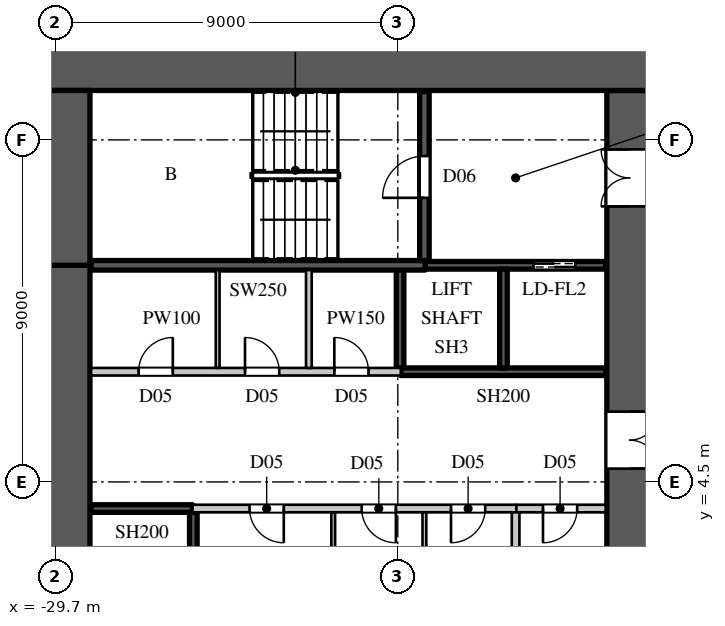
"""IFC4 building model, lengths in metres.
Left out: names, types, materials, properties, quantities, classifications, styles, units other than length and angle.
Written with IfcOpenShell. Run it as: python <this file> out.ifc"""

import sys

from ifc_helpers import new_model, si_unit, direction, frame, frame_2d, origin, place, context, subcontext, project, spatial, rectangle, extrude, element, fill, save


model = new_model("IFC4")
c1 = context("Model", 3, precision=1e-05, world=origin(), true_north=direction((0.0, 1.0)))
c2 = subcontext(c1, "Body", "Model", "MODEL_VIEW")
j1 = project(units=[si_unit("LENGTHUNIT", "METRE"), si_unit("PLANEANGLEUNIT", "RADIAN")], contexts=[c1])
p1 = place(None, origin())
s1 = spatial("IfcSite", under=j1, at=p1, CompositionType="ELEMENT")
p2 = place(p1, origin())
s2 = spatial("IfcBuilding", under=s1, at=p2, CompositionType="ELEMENT")
p3 = place(p2, frame((0.0, 0.0, 44.0)))
s3 = spatial("IfcBuildingStorey", under=s2, at=p3, CompositionType="ELEMENT", Elevation=44.0)
p4 = place(p3, frame((-30.0, 15.4, 0.0), z_axis=(0.0, 0.0, 1.0), x_axis=(1.0, 0.0, 0.0)))
e1 = element("IfcWall", 1, at=p4, inside=s3, PredefinedType="SHEAR", context=c2, shape_type="SweptSolid", body=[
    extrude(rectangle(XDim=16.0, YDim=1.2, at=frame_2d((8.0, 0.0))), origin(), (0.0, 0.0, 1.0), 6.0),
])
p5 = place(p3, frame((-14.6, -14.8, 0.0), z_axis=(0.0, 0.0, 1.0), x_axis=(0.0, 1.0, 0.0)))
e2 = element("IfcWall", 2, at=p5, inside=s3, PredefinedType="SHEAR", context=c2, shape_type="SweptSolid", body=[
    extrude(rectangle(XDim=29.6, YDim=1.2, at=frame_2d((14.8, 0.0))), origin(), (0.0, 0.0, 1.0), 6.0),
])
p6 = place(p5, frame((1.55, 0.0, 0.0)))
e3 = element("IfcOpeningElement", 3, at=p6, cuts=e2, PredefinedType="OPENING", context=c2, shape_type="SweptSolid", body=[
    extrude(rectangle(XDim=1.5, YDim=2.4, at=frame_2d((0.75, 1.2))), frame((0.0, 0.61, 0.0), z_axis=(0.0, -1.0, 0.0), x_axis=(1.0, 0.0, 0.0)), (0.0, 0.0, 1.0), 1.22),
])
p7 = place(p5, frame((26.55, 0.0, 0.0)))
e4 = element("IfcOpeningElement", 4, at=p7, cuts=e2, PredefinedType="OPENING", context=c2, shape_type="SweptSolid", body=[
    extrude(rectangle(XDim=1.5, YDim=2.4, at=frame_2d((0.75, 1.2))), frame((0.0, 0.61, 0.0), z_axis=(0.0, -1.0, 0.0), x_axis=(1.0, 0.0, 0.0)), (0.0, 0.0, 1.0), 1.22),
])
p8 = place(p5, frame((8.45, 0.0, 0.0)))
e5 = element("IfcOpeningElement", 5, at=p8, cuts=e2, PredefinedType="OPENING", context=c2, shape_type="SweptSolid", body=[
    extrude(rectangle(XDim=1.5, YDim=2.4, at=frame_2d((0.75, 1.2))), frame((0.0, 0.61, 0.0), z_axis=(0.0, -1.0, 0.0), x_axis=(1.0, 0.0, 0.0)), (0.0, 0.0, 1.0), 1.22),
])
p9 = place(p5, frame((19.65, 0.0, 0.0)))
e6 = element("IfcOpeningElement", 6, at=p9, cuts=e2, PredefinedType="OPENING", context=c2, shape_type="SweptSolid", body=[
    extrude(rectangle(XDim=1.5, YDim=2.4, at=frame_2d((0.75, 1.2))), frame((0.0, 0.61, 0.0), z_axis=(0.0, -1.0, 0.0), x_axis=(1.0, 0.0, 0.0)), (0.0, 0.0, 1.0), 1.22),
])
p10 = place(p5, frame((14.5, 0.0, 0.0)))
e7 = element("IfcOpeningElement", 7, at=p10, cuts=e2, PredefinedType="OPENING", context=c2, shape_type="SweptSolid", body=[
    extrude(rectangle(XDim=0.6, YDim=2.0, at=frame_2d((0.3, 1.0))), frame((0.0, 0.61, 0.0), z_axis=(0.0, -1.0, 0.0), x_axis=(1.0, 0.0, 0.0)), (0.0, 0.0, 1.0), 1.22),
])
p11 = place(p3, frame((-29.4, -10.2, 0.0), z_axis=(0.0, 0.0, 1.0), x_axis=(0.0, 1.0, 0.0)))
e8 = element("IfcWall", 8, at=p11, inside=s3, PredefinedType="SHEAR", context=c2, shape_type="SweptSolid", body=[
    extrude(rectangle(XDim=20.4, YDim=1.2, at=frame_2d((10.2, 0.0))), origin(), (0.0, 0.0, 1.0), 6.0),
])
p12 = place(p3, frame((-29.4, 10.2, 0.0), z_axis=(0.0, 0.0, 1.0), x_axis=(0.0, 1.0, 0.0)))
e9 = element("IfcWall", 9, at=p12, inside=s3, PredefinedType="SHEAR", context=c2, shape_type="SweptSolid", body=[
    extrude(rectangle(XDim=4.6, YDim=1.2, at=frame_2d((2.3, 0.0))), origin(), (0.0, 0.0, 1.0), 6.0),
])
p13 = place(p3, frame((-28.77, 7.4, 0.0), z_axis=(0.0, 0.0, 1.0), x_axis=(1.0, 0.0, 0.0)))
e10 = element("IfcWall", 10, at=p13, inside=s3, PredefinedType="PARTITIONING", context=c2, shape_type="SweptSolid", body=[
    extrude(rectangle(XDim=8.15, YDim=0.2, at=frame_2d((4.075, 0.0))), origin(), (0.0, 0.0, 1.0), 5.596),
])
p14 = place(p13, frame((1.25, 0.0, 0.0)))
e11 = element("IfcOpeningElement", 11, at=p14, cuts=e10, PredefinedType="OPENING", context=c2, shape_type="SweptSolid", body=[
    extrude(rectangle(XDim=0.9, YDim=2.2, at=frame_2d((0.45, 1.1))), frame((0.0, 0.11, 0.0), z_axis=(0.0, -1.0, 0.0), x_axis=(1.0, 0.0, 0.0)), (0.0, 0.0, 1.0), 0.22),
])
p15 = place(p13, frame((4.05, 0.0, 0.0)))
e12 = element("IfcOpeningElement", 12, at=p15, cuts=e10, PredefinedType="OPENING", context=c2, shape_type="SweptSolid", body=[
    extrude(rectangle(XDim=0.9, YDim=2.2, at=frame_2d((0.45, 1.1))), frame((0.0, 0.11, 0.0), z_axis=(0.0, -1.0, 0.0), x_axis=(1.0, 0.0, 0.0)), (0.0, 0.0, 1.0), 0.22),
])
p16 = place(p13, frame((6.4, 0.0, 0.0)))
e13 = element("IfcOpeningElement", 13, at=p16, cuts=e10, PredefinedType="OPENING", context=c2, shape_type="SweptSolid", body=[
    extrude(rectangle(XDim=0.9, YDim=2.2, at=frame_2d((0.45, 1.1))), frame((0.0, 0.11, 0.0), z_axis=(0.0, -1.0, 0.0), x_axis=(1.0, 0.0, 0.0)), (0.0, 0.0, 1.0), 0.22),
])
p17 = place(p3, frame((-26.1, 3.8, 0.0), z_axis=(0.0, 0.0, 1.0), x_axis=(1.0, 0.0, 0.0)))
e14 = element("IfcWall", 14, at=p17, inside=s3, PredefinedType="PARTITIONING", context=c2, shape_type="SweptSolid", body=[
    extrude(rectangle(XDim=8.52, YDim=0.2, at=frame_2d((4.26, 0.0))), origin(), (0.0, 0.0, 1.0), 5.596),
])
p18 = place(p17, frame((1.5, 0.0, 0.0)))
e15 = element("IfcOpeningElement", 15, at=p18, cuts=e14, PredefinedType="OPENING", context=c2, shape_type="SweptSolid", body=[
    extrude(rectangle(XDim=0.9, YDim=2.2, at=frame_2d((0.45, 1.1))), frame((0.0, 0.11, 0.0), z_axis=(0.0, -1.0, 0.0), x_axis=(1.0, 0.0, 0.0)), (0.0, 0.0, 1.0), 0.22),
])
p19 = place(p17, frame((4.45, 0.0, 0.0)))
e16 = element("IfcOpeningElement", 16, at=p19, cuts=e14, PredefinedType="OPENING", context=c2, shape_type="SweptSolid", body=[
    extrude(rectangle(XDim=0.9, YDim=2.2, at=frame_2d((0.45, 1.1))), frame((0.0, 0.11, 0.0), z_axis=(0.0, -1.0, 0.0), x_axis=(1.0, 0.0, 0.0)), (0.0, 0.0, 1.0), 0.22),
])
p20 = place(p17, frame((6.8, 0.0, 0.0)))
e17 = element("IfcOpeningElement", 17, at=p20, cuts=e14, PredefinedType="OPENING", context=c2, shape_type="SweptSolid", body=[
    extrude(rectangle(XDim=0.9, YDim=2.2, at=frame_2d((0.45, 1.1))), frame((0.0, 0.11, 0.0), z_axis=(0.0, -1.0, 0.0), x_axis=(1.0, 0.0, 0.0)), (0.0, 0.0, 1.0), 0.22),
])
p21 = place(p3, frame((-23.04, 7.5, 0.0), z_axis=(0.0, 0.0, 1.0), x_axis=(0.0, 1.0, 0.0)))
e18 = element("IfcWall", 18, at=p21, inside=s3, PredefinedType="PARTITIONING", context=c2, shape_type="SweptSolid", body=[
    extrude(rectangle(XDim=2.575, YDim=0.15, at=frame_2d((1.288, 0.0))), origin(), (0.0, 0.0, 1.0), 5.596),
])
p22 = place(p3, frame((-17.58, 3.8, 0.0), z_axis=(0.0, 0.0, 1.0), x_axis=(1.0, 0.0, 0.0)))
e19 = element("IfcWall", 19, at=p22, inside=s3, PredefinedType="PARTITIONING", context=c2, shape_type="SweptSolid", body=[
    extrude(rectangle(XDim=2.35, YDim=0.2, at=frame_2d((1.175, 0.0))), origin(), (0.0, 0.0, 1.0), 5.596),
])
p23 = place(p22, frame((0.7, 0.0, 0.0)))
e20 = element("IfcOpeningElement", 20, at=p23, cuts=e19, PredefinedType="OPENING", context=c2, shape_type="SweptSolid", body=[
    extrude(rectangle(XDim=0.9, YDim=2.2, at=frame_2d((0.45, 1.1))), frame((0.0, 0.11, 0.0), z_axis=(0.0, -1.0, 0.0), x_axis=(1.0, 0.0, 0.0)), (0.0, 0.0, 1.0), 0.22),
])
p24 = place(p3, frame((-17.6, 1.1, 0.0), z_axis=(0.0, 0.0, 1.0), x_axis=(0.0, 1.0, 0.0)))
e21 = element("IfcWall", 21, at=p24, inside=s3, PredefinedType="PARTITIONING", context=c2, shape_type="SweptSolid", body=[
    extrude(rectangle(XDim=2.6, YDim=0.2, at=frame_2d((1.3, 0.0))), origin(), (0.0, 0.0, 1.0), 5.596),
])
p25 = place(p3, frame((-28.77, 3.8, 0.0), z_axis=(0.0, 0.0, 1.0), x_axis=(1.0, 0.0, 0.0)))
e22 = element("IfcWall", 22, at=p25, inside=s3, PredefinedType="SHEAR", context=c2, shape_type="SweptSolid", body=[
    extrude(rectangle(XDim=2.67, YDim=0.2, at=frame_2d((1.335, 0.0))), origin(), (0.0, 0.0, 1.0), 5.596),
])
p26 = place(p3, frame((-26.08, 1.1, 0.0), z_axis=(0.0, 0.0, 1.0), x_axis=(0.0, 1.0, 0.0)))
e23 = element("IfcWall", 23, at=p26, inside=s3, PredefinedType="SHEAR", context=c2, shape_type="SweptSolid", body=[
    extrude(rectangle(XDim=2.6, YDim=0.2, at=frame_2d((1.3, 0.0))), origin(), (0.0, 0.0, 1.0), 5.596),
])
p27 = place(p3, frame((-20.64, 7.5, 0.0), z_axis=(0.0, 0.0, 1.0), x_axis=(0.0, 1.0, 0.0)))
e24 = element("IfcWall", 24, at=p27, inside=s3, PredefinedType="SHEAR", context=c2, shape_type="SweptSolid", body=[
    extrude(rectangle(XDim=2.575, YDim=0.2, at=frame_2d((1.288, 0.0))), origin(), (0.0, 0.0, 1.0), 5.596),
])
p28 = place(p3, frame((-20.62, 7.4, 0.0), z_axis=(0.0, 0.0, 1.0), x_axis=(1.0, 0.0, 0.0)))
e25 = element("IfcWall", 25, at=p28, inside=s3, PredefinedType="SHEAR", context=c2, shape_type="SweptSolid", body=[
    extrude(rectangle(XDim=5.39, YDim=0.2, at=frame_2d((2.695, 0.0))), origin(), (0.0, 0.0, 1.0), 5.596),
])
p29 = place(p3, frame((-19.98, 10.2, 0.0), z_axis=(0.0, 0.0, 1.0), x_axis=(1.0, 0.0, 0.0)))
e26 = element("IfcWall", 26, at=p29, inside=s3, PredefinedType="SHEAR", context=c2, shape_type="SweptSolid", body=[
    extrude(rectangle(XDim=4.75, YDim=0.2, at=frame_2d((2.375, 0.0))), origin(), (0.0, 0.0, 1.0), 5.596),
])
p30 = place(p29, frame((2.85, 0.0, 0.0)))
e27 = element("IfcOpeningElement", 27, at=p30, cuts=e26, PredefinedType="OPENING", context=c2, shape_type="SweptSolid", body=[
    extrude(rectangle(XDim=1.1, YDim=2.2, at=frame_2d((0.55, 1.1))), frame((0.0, 0.11, 0.0), z_axis=(0.0, -1.0, 0.0), x_axis=(1.0, 0.0, 0.0)), (0.0, 0.0, 1.0), 0.22),
])
p31 = place(p3, frame((-17.92, 7.5, 0.0), z_axis=(0.0, 0.0, 1.0), x_axis=(0.0, 1.0, 0.0)))
e28 = element("IfcWall", 28, at=p31, inside=s3, PredefinedType="SHEAR", context=c2, shape_type="SweptSolid", body=[
    extrude(rectangle(XDim=2.6, YDim=0.2, at=frame_2d((1.3, 0.0))), origin(), (0.0, 0.0, 1.0), 6.0),
])
p32 = place(p3, frame((-28.77, 10.2, 0.0), z_axis=(0.0, 0.0, 1.0), x_axis=(1.0, 0.0, 0.0)))
e29 = element("IfcWall", 29, at=p32, inside=s3, PredefinedType="SHEAR", context=c2, shape_type="SweptSolid", body=[
    extrude(rectangle(XDim=8.79, YDim=0.25, at=frame_2d((4.395, 0.0))), origin(), (0.0, 0.0, 1.0), 5.596),
])
p33 = place(p3, frame((-20.0, 10.325, 0.0), z_axis=(0.0, 0.0, 1.0), x_axis=(0.0, 1.0, 0.0)))
e30 = element("IfcWall", 30, at=p33, inside=s3, PredefinedType="SHEAR", context=c2, shape_type="SweptSolid", body=[
    extrude(rectangle(XDim=4.445, YDim=0.25, at=frame_2d((2.223, 0.0))), origin(), (0.0, 0.0, 1.0), 5.596),
])
p34 = place(p33, frame((1.65, 0.0, 0.0)))
e31 = element("IfcOpeningElement", 31, at=p34, cuts=e30, PredefinedType="OPENING", context=c2, shape_type="SweptSolid", body=[
    extrude(rectangle(XDim=1.1, YDim=2.2, at=frame_2d((0.55, 1.1))), frame((0.0, 0.135, 0.0), z_axis=(0.0, -1.0, 0.0), x_axis=(1.0, 0.0, 0.0)), (0.0, 0.0, 1.0), 0.27),
])
p35 = place(p3, frame((-25.44, 7.5, 0.0), z_axis=(0.0, 0.0, 1.0), x_axis=(0.0, 1.0, 0.0)))
e32 = element("IfcWall", 32, at=p35, inside=s3, PredefinedType="PARTITIONING", context=c2, shape_type="SweptSolid", body=[
    extrude(rectangle(XDim=2.575, YDim=0.1, at=frame_2d((1.288, 0.0))), origin(), (0.0, 0.0, 1.0), 5.596),
])
for number, where, z_axis, x_axis in (
    (33, (-22.4, 1.1, 0.0), (0.0, 0.0, 1.0), (0.0, 1.0, 0.0)),
    (34, (-20.0, 1.1, 0.0), (0.0, 0.0, 1.0), (0.0, 1.0, 0.0)),
):
    element("IfcWall", number, at=place(p3, frame(where, z_axis=z_axis, x_axis=x_axis)), inside=s3, PredefinedType="PARTITIONING", context=c2, shape_type="SweptSolid", body=[
        extrude(rectangle(XDim=2.6, YDim=0.1, at=frame_2d((1.3, 0.0))), origin(), (0.0, 0.0, 1.0), 5.596),
    ])
p36 = place(p34, origin())
e35 = element("IfcDoor", 35, at=p36, inside=s3, OperationType="SINGLE_SWING_LEFT", PredefinedType="DOOR", context=c2, shape_type="SweptSolid", body=[
    extrude(rectangle(XDim=1.1, YDim=2.2, at=frame_2d((0.55, 1.1))), frame((0.0, 0.025, 0.0), z_axis=(0.0, -1.0, 0.0), x_axis=(1.0, 0.0, 0.0)), (0.0, 0.0, 1.0), 0.05),
])
fill(e31, e35)
p37 = place(p18, origin())
e36 = element("IfcDoor", 36, at=p37, inside=s3, OperationType="SINGLE_SWING_LEFT", PredefinedType="DOOR", context=c2, shape_type="SweptSolid", body=[
    extrude(rectangle(XDim=0.9, YDim=2.2, at=frame_2d((0.45, 1.1))), frame((0.0, 0.025, 0.0), z_axis=(0.0, -1.0, 0.0), x_axis=(1.0, 0.0, 0.0)), (0.0, 0.0, 1.0), 0.05),
])
fill(e15, e36)
p38 = place(p19, origin())
e37 = element("IfcDoor", 37, at=p38, inside=s3, OperationType="SINGLE_SWING_LEFT", PredefinedType="DOOR", context=c2, shape_type="SweptSolid", body=[
    extrude(rectangle(XDim=0.9, YDim=2.2, at=frame_2d((0.45, 1.1))), frame((0.0, 0.025, 0.0), z_axis=(0.0, -1.0, 0.0), x_axis=(1.0, 0.0, 0.0)), (0.0, 0.0, 1.0), 0.05),
])
fill(e16, e37)
p39 = place(p20, origin())
e38 = element("IfcDoor", 38, at=p39, inside=s3, OperationType="SINGLE_SWING_RIGHT", PredefinedType="DOOR", context=c2, shape_type="SweptSolid", body=[
    extrude(rectangle(XDim=0.9, YDim=2.2, at=frame_2d((0.45, 1.1))), frame((0.0, 0.025, 0.0), z_axis=(0.0, -1.0, 0.0), x_axis=(1.0, 0.0, 0.0)), (0.0, 0.0, 1.0), 0.05),
])
fill(e17, e38)
p40 = place(p23, origin())
e39 = element("IfcDoor", 39, at=p40, inside=s3, OperationType="SINGLE_SWING_RIGHT", PredefinedType="DOOR", context=c2, shape_type="SweptSolid", body=[
    extrude(rectangle(XDim=0.9, YDim=2.2, at=frame_2d((0.45, 1.1))), frame((0.0, 0.025, 0.0), z_axis=(0.0, -1.0, 0.0), x_axis=(1.0, 0.0, 0.0)), (0.0, 0.0, 1.0), 0.05),
])
fill(e20, e39)
p41 = place(p14, origin())
e40 = element("IfcDoor", 40, at=p41, inside=s3, OperationType="SINGLE_SWING_RIGHT", PredefinedType="DOOR", context=c2, shape_type="SweptSolid", body=[
    extrude(rectangle(XDim=0.9, YDim=2.2, at=frame_2d((0.45, 1.1))), frame((0.0, 0.025, 0.0), z_axis=(0.0, -1.0, 0.0), x_axis=(1.0, 0.0, 0.0)), (0.0, 0.0, 1.0), 0.05),
])
fill(e11, e40)
p42 = place(p15, origin())
e41 = element("IfcDoor", 41, at=p42, inside=s3, OperationType="SINGLE_SWING_LEFT", PredefinedType="DOOR", context=c2, shape_type="SweptSolid", body=[
    extrude(rectangle(XDim=0.9, YDim=2.2, at=frame_2d((0.45, 1.1))), frame((0.0, 0.025, 0.0), z_axis=(0.0, -1.0, 0.0), x_axis=(1.0, 0.0, 0.0)), (0.0, 0.0, 1.0), 0.05),
])
fill(e12, e41)
p43 = place(p16, origin())
e42 = element("IfcDoor", 42, at=p43, inside=s3, OperationType="SINGLE_SWING_LEFT", PredefinedType="DOOR", context=c2, shape_type="SweptSolid", body=[
    extrude(rectangle(XDim=0.9, YDim=2.2, at=frame_2d((0.45, 1.1))), frame((0.0, 0.025, 0.0), z_axis=(0.0, -1.0, 0.0), x_axis=(1.0, 0.0, 0.0)), (0.0, 0.0, 1.0), 0.05),
])
fill(e13, e42)
p44 = place(p30, origin())
e43 = element("IfcDoor", 43, at=p44, inside=s3, OperationType="DOUBLE_DOOR_SLIDING", PredefinedType="DOOR", context=c2, shape_type="SweptSolid", body=[
    extrude(rectangle(XDim=1.1, YDim=2.2, at=frame_2d((0.55, 1.1))), frame((0.0, 0.025, 0.0), z_axis=(0.0, -1.0, 0.0), x_axis=(1.0, 0.0, 0.0)), (0.0, 0.0, 1.0), 0.05),
])
fill(e27, e43)
p45 = place(p7, origin())
e44 = element("IfcDoor", 44, at=p45, inside=s3, OperationType="DOUBLE_DOOR_SINGLE_SWING", PredefinedType="DOOR", context=c2, shape_type="SweptSolid", body=[
    extrude(rectangle(XDim=1.5, YDim=2.4, at=frame_2d((0.75, 1.2))), frame((0.0, 0.025, 0.0), z_axis=(0.0, -1.0, 0.0), x_axis=(1.0, 0.0, 0.0)), (0.0, 0.0, 1.0), 0.05),
])
fill(e4, e44)
p46 = place(p9, origin())
e45 = element("IfcDoor", 45, at=p46, inside=s3, OperationType="DOUBLE_DOOR_SINGLE_SWING", PredefinedType="DOOR", context=c2, shape_type="SweptSolid", body=[
    extrude(rectangle(XDim=1.5, YDim=2.4, at=frame_2d((0.75, 1.2))), frame((0.0, 0.025, 0.0), z_axis=(0.0, -1.0, 0.0), x_axis=(1.0, 0.0, 0.0)), (0.0, 0.0, 1.0), 0.05),
])
fill(e6, e45)
save(model, sys.argv[1])
